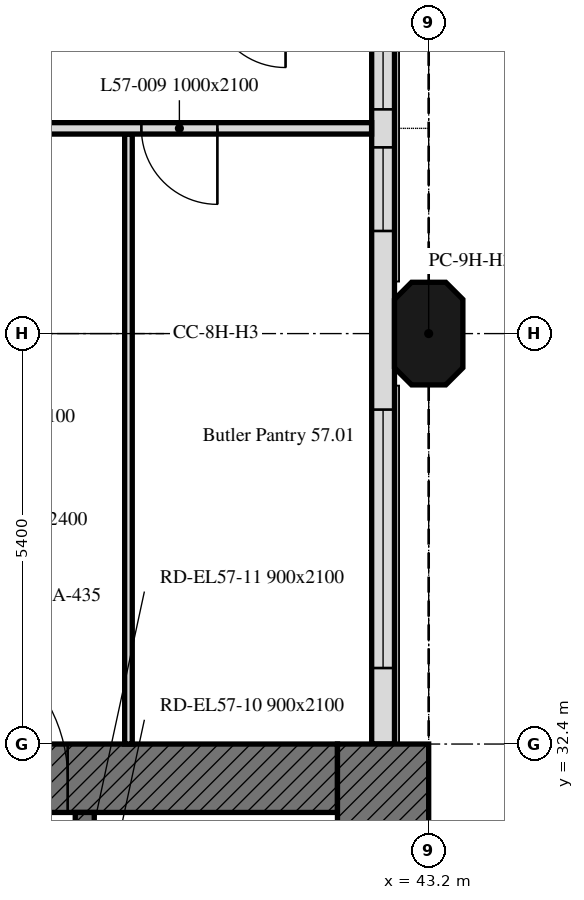
"""IFC4 building model, lengths in metres.
Left out: names, types, materials, properties, quantities, classifications, styles, units other than length and angle.
Written with IfcOpenShell. Run it as: python <this file> out.ifc"""

import sys

from ifc_helpers import new_model, si_unit, direction, frame, frame_2d, origin, place, context, subcontext, project, spatial, polyline, rectangle, outline, extrude, element, fill, save


model = new_model("IFC4")
c1 = context("Model", 3, precision=1e-05, world=origin(), true_north=direction((0.0, 1.0)))
c2 = subcontext(c1, "Body", "Model", "MODEL_VIEW")
j1 = project(units=[si_unit("LENGTHUNIT", "METRE"), si_unit("PLANEANGLEUNIT", "RADIAN")], contexts=[c1])
p1 = place(None, origin())
s1 = spatial("IfcSite", under=j1, at=p1, CompositionType="ELEMENT")
p2 = place(p1, origin())
s2 = spatial("IfcBuilding", under=s1, at=p2, CompositionType="ELEMENT")
p3 = place(p2, frame((0.0, 0.0, 226.9)))
s3 = spatial("IfcBuildingStorey", under=s2, at=p3, CompositionType="ELEMENT", Elevation=226.9)
p4 = place(p3, frame((43.2, 37.8, 0.0), z_axis=(0.0, 0.0, 1.0), x_axis=(0.0, 1.0, 0.0)))
e1 = element("IfcColumn", 1, at=p4, inside=s3, PredefinedType="COLUMN", context=c2, shape_type="SweptSolid", body=[
    extrude(outline(polyline([(-0.45, -0.45), (0.45, -0.45), (0.675, -0.225), (0.675, 0.225), (0.45, 0.45), (-0.45, 0.45), (-0.675, 0.225), (-0.675, -0.225), (-0.45, -0.45)])), origin(), (0.0, 0.0, 1.0), 3.0),
])
p5 = place(p3, frame((42.6, 32.4, 0.0), z_axis=(0.0, 0.0, 1.0), x_axis=(0.0, 1.0, 0.0)))
e2 = element("IfcWall", 2, at=p5, inside=s3, PredefinedType="SOLIDWALL", context=c2, shape_type="SweptSolid", body=[
    extrude(rectangle(XDim=10.614, YDim=0.3, at=frame_2d((5.307, 0.0))), origin(), (0.0, 0.0, 1.0), 3.0),
])
p6 = place(p5, frame((1.0, 0.0, 0.9)))
e3 = element("IfcOpeningElement", 3, at=p6, cuts=e2, PredefinedType="OPENING", context=c2, shape_type="SweptSolid", body=[
    extrude(rectangle(XDim=3.4, YDim=1.7, at=frame_2d((1.7, 0.85))), frame((0.0, 0.16, 0.0), z_axis=(0.0, -1.0, 0.0), x_axis=(1.0, 0.0, 0.0)), (0.0, 0.0, 1.0), 0.32),
])
p7 = place(p5, frame((6.75, 0.0, 0.9)))
e4 = element("IfcOpeningElement", 4, at=p7, cuts=e2, PredefinedType="OPENING", context=c2, shape_type="SweptSolid", body=[
    extrude(rectangle(XDim=1.1, YDim=1.7, at=frame_2d((0.55, 0.85))), frame((0.0, 0.16, 0.0), z_axis=(0.0, -1.0, 0.0), x_axis=(1.0, 0.0, 0.0)), (0.0, 0.0, 1.0), 0.32),
])
p8 = place(p5, frame((8.35, 0.0, 0.9)))
e5 = element("IfcOpeningElement", 5, at=p8, cuts=e2, PredefinedType="OPENING", context=c2, shape_type="SweptSolid", body=[
    extrude(rectangle(XDim=1.1, YDim=1.7, at=frame_2d((0.55, 0.85))), frame((0.0, 0.16, 0.0), z_axis=(0.0, -1.0, 0.0), x_axis=(1.0, 0.0, 0.0)), (0.0, 0.0, 1.0), 0.32),
])
p9 = place(p3, frame((30.9, 31.95, 0.0), z_axis=(0.0, 0.0, 1.0), x_axis=(1.0, 0.0, 0.0)))
e6 = element("IfcWall", 6, at=p9, inside=s3, PredefinedType="SOLIDWALL", context=c2, shape_type="SweptSolid", body=[
    extrude(rectangle(XDim=11.1, YDim=0.9, at=frame_2d((5.55, 0.0))), origin(), (0.0, 0.0, 1.0), 3.0),
])
p10 = place(p9, frame((5.55, 0.0, 0.0)))
e7 = element("IfcOpeningElement", 7, at=p10, cuts=e6, PredefinedType="OPENING", context=c2, shape_type="SweptSolid", body=[
    extrude(rectangle(XDim=2.0, YDim=2.4, at=frame_2d((1.0, 1.2))), frame((0.0, 0.45, 0.0), z_axis=(0.0, -1.0, 0.0), x_axis=(1.0, 0.0, 0.0)), (0.0, 0.0, 1.0), 0.9),
])
p11 = place(p3, frame((42.6, 32.4, 0.0), z_axis=(0.0, 0.0, 1.0), x_axis=(0.0, -1.0, 0.0)))
e8 = element("IfcWall", 8, at=p11, inside=s3, PredefinedType="SOLIDWALL", context=c2, shape_type="SweptSolid", body=[
    extrude(rectangle(XDim=16.2, YDim=1.2, at=frame_2d((8.1, 0.0))), origin(), (0.0, 0.0, 1.0), 3.0),
])
p12 = place(p3, frame((38.675, 17.1, 0.0), z_axis=(0.0, 0.0, 1.0), x_axis=(0.0, 1.0, 0.0)))
e9 = element("IfcWall", 9, at=p12, inside=s3, PredefinedType="SOLIDWALL", context=c2, shape_type="SweptSolid", body=[
    extrude(rectangle(XDim=14.4, YDim=0.25, at=frame_2d((7.2, 0.0))), origin(), (0.0, 0.0, 1.0), 3.0),
])
p13 = place(p12, frame((4.6, 0.0, 0.0)))
e10 = element("IfcOpeningElement", 10, at=p13, cuts=e9, PredefinedType="OPENING", context=c2, shape_type="SweptSolid", body=[
    extrude(rectangle(XDim=1.0, YDim=2.1, at=frame_2d((0.5, 1.05))), frame((0.0, 0.125, 0.0), z_axis=(0.0, -1.0, 0.0), x_axis=(1.0, 0.0, 0.0)), (0.0, 0.0, 1.0), 0.25),
])
p14 = place(p12, frame((7.062, 0.0, 0.0)))
e11 = element("IfcOpeningElement", 11, at=p14, cuts=e9, PredefinedType="OPENING", context=c2, shape_type="SweptSolid", body=[
    extrude(rectangle(XDim=1.2, YDim=2.1, at=frame_2d((0.6, 1.05))), frame((0.0, 0.125, 0.0), z_axis=(0.0, -1.0, 0.0), x_axis=(1.0, 0.0, 0.0)), (0.0, 0.0, 1.0), 0.25),
])
p15 = place(p12, frame((9.726, 0.0, 0.0)))
e12 = element("IfcOpeningElement", 12, at=p15, cuts=e9, PredefinedType="OPENING", context=c2, shape_type="SweptSolid", body=[
    extrude(rectangle(XDim=0.9, YDim=2.1, at=frame_2d((0.45, 1.05))), frame((0.0, 0.125, 0.0), z_axis=(0.0, -1.0, 0.0), x_axis=(1.0, 0.0, 0.0)), (0.0, 0.0, 1.0), 0.25),
])
p16 = place(p12, frame((11.539, 0.0, 0.0)))
e13 = element("IfcOpeningElement", 13, at=p16, cuts=e9, PredefinedType="OPENING", context=c2, shape_type="SweptSolid", body=[
    extrude(rectangle(XDim=0.9, YDim=2.1, at=frame_2d((0.45, 1.05))), frame((0.0, 0.125, 0.0), z_axis=(0.0, -1.0, 0.0), x_axis=(1.0, 0.0, 0.0)), (0.0, 0.0, 1.0), 0.25),
])
p17 = place(p12, frame((13.226, 0.0, 0.0)))
e14 = element("IfcOpeningElement", 14, at=p17, cuts=e9, PredefinedType="OPENING", context=c2, shape_type="SweptSolid", body=[
    extrude(rectangle(XDim=0.9, YDim=2.1, at=frame_2d((0.45, 1.05))), frame((0.0, 0.125, 0.0), z_axis=(0.0, -1.0, 0.0), x_axis=(1.0, 0.0, 0.0)), (0.0, 0.0, 1.0), 0.25),
])
p18 = place(p3, frame((39.25, 32.4, 0.0), z_axis=(0.0, 0.0, 1.0), x_axis=(0.0, 1.0, 0.0)))
e15 = element("IfcWall", 15, at=p18, inside=s3, PredefinedType="PARTITIONING", context=c2, shape_type="SweptSolid", body=[
    extrude(rectangle(XDim=8.025, YDim=0.1, at=frame_2d((4.013, 0.0))), origin(), (0.0, 0.0, 1.0), 3.0),
])
p19 = place(p3, frame((42.449, 40.5, 0.0), z_axis=(0.0, 0.0, 1.0), x_axis=(-1.0, 0.0, 0.0)))
e16 = element("IfcWall", 16, at=p19, inside=s3, PredefinedType="PARTITIONING", context=c2, shape_type="SweptSolid", body=[
    extrude(rectangle(XDim=36.974, YDim=0.15, at=frame_2d((18.487, 0.0))), origin(), (0.0, 0.0, 1.0), 2.4),
])
p20 = place(p19, frame((17.649, 0.0, 0.0)))
e17 = element("IfcOpeningElement", 17, at=p20, cuts=e16, PredefinedType="OPENING", context=c2, shape_type="SweptSolid", body=[
    extrude(rectangle(XDim=1.0, YDim=2.1, at=frame_2d((0.5, 1.05))), frame((0.0, 0.075, 0.0), z_axis=(0.0, -1.0, 0.0), x_axis=(1.0, 0.0, 0.0)), (0.0, 0.0, 1.0), 0.15),
])
p21 = place(p19, frame((2.029, 0.0, 0.0)))
e18 = element("IfcOpeningElement", 18, at=p21, cuts=e16, PredefinedType="OPENING", context=c2, shape_type="SweptSolid", body=[
    extrude(rectangle(XDim=1.0, YDim=2.1, at=frame_2d((0.5, 1.05))), frame((0.0, 0.075, 0.0), z_axis=(0.0, -1.0, 0.0), x_axis=(1.0, 0.0, 0.0)), (0.0, 0.0, 1.0), 0.15),
])
p22 = place(p19, frame((27.374, 0.0, 0.0)))
e19 = element("IfcOpeningElement", 19, at=p22, cuts=e16, PredefinedType="OPENING", context=c2, shape_type="SweptSolid", body=[
    extrude(rectangle(XDim=1.0, YDim=2.1, at=frame_2d((0.5, 1.05))), frame((0.0, 0.075, 0.0), z_axis=(0.0, -1.0, 0.0), x_axis=(1.0, 0.0, 0.0)), (0.0, 0.0, 1.0), 0.15),
])
p23 = place(p19, frame((7.924, 0.0, 0.0)))
e20 = element("IfcOpeningElement", 20, at=p23, cuts=e16, PredefinedType="OPENING", context=c2, shape_type="SweptSolid", body=[
    extrude(rectangle(XDim=1.0, YDim=2.1, at=frame_2d((0.5, 1.05))), frame((0.0, 0.075, 0.0), z_axis=(0.0, -1.0, 0.0), x_axis=(1.0, 0.0, 0.0)), (0.0, 0.0, 1.0), 0.15),
])
p24 = place(p19, frame((4.699, 0.0, 0.0)))
e21 = element("IfcOpeningElement", 21, at=p24, cuts=e16, PredefinedType="OPENING", context=c2, shape_type="SweptSolid", body=[
    extrude(rectangle(XDim=1.8, YDim=2.4, at=frame_2d((0.9, 1.2))), frame((0.0, 0.075, 0.0), z_axis=(0.0, -1.0, 0.0), x_axis=(1.0, 0.0, 0.0)), (0.0, 0.0, 1.0), 0.15),
])
p25 = place(p19, frame((30.199, 0.0, 0.0)))
e22 = element("IfcOpeningElement", 22, at=p25, cuts=e16, PredefinedType="OPENING", context=c2, shape_type="SweptSolid", body=[
    extrude(rectangle(XDim=1.0, YDim=2.1, at=frame_2d((0.5, 1.05))), frame((0.0, 0.075, 0.0), z_axis=(0.0, -1.0, 0.0), x_axis=(1.0, 0.0, 0.0)), (0.0, 0.0, 1.0), 0.15),
])
p26 = place(p6, origin())
e23 = element("IfcWindow", 23, at=p26, inside=s3, PartitioningType="SINGLE_PANEL", PredefinedType="WINDOW", context=c2, shape_type="SweptSolid", body=[
    extrude(rectangle(XDim=3.4, YDim=1.7, at=frame_2d((1.7, 0.85))), frame((0.0, 0.03, 0.0), z_axis=(0.0, -1.0, 0.0), x_axis=(1.0, 0.0, 0.0)), (0.0, 0.0, 1.0), 0.06),
])
fill(e3, e23)
p27 = place(p7, origin())
e24 = element("IfcWindow", 24, at=p27, inside=s3, PartitioningType="SINGLE_PANEL", PredefinedType="WINDOW", context=c2, shape_type="SweptSolid", body=[
    extrude(rectangle(XDim=1.1, YDim=1.7, at=frame_2d((0.55, 0.85))), frame((0.0, 0.03, 0.0), z_axis=(0.0, -1.0, 0.0), x_axis=(1.0, 0.0, 0.0)), (0.0, 0.0, 1.0), 0.06),
])
fill(e4, e24)
p28 = place(p8, origin())
e25 = element("IfcWindow", 25, at=p28, inside=s3, PartitioningType="SINGLE_PANEL", PredefinedType="WINDOW", context=c2, shape_type="SweptSolid", body=[
    extrude(rectangle(XDim=1.1, YDim=1.7, at=frame_2d((0.55, 0.85))), frame((0.0, 0.03, 0.0), z_axis=(0.0, -1.0, 0.0), x_axis=(1.0, 0.0, 0.0)), (0.0, 0.0, 1.0), 0.06),
])
fill(e5, e25)
p29 = place(p10, origin())
e26 = element("IfcDoor", 26, at=p29, inside=s3, OperationType="DOUBLE_DOOR_SINGLE_SWING", PredefinedType="DOOR", context=c2, shape_type="SweptSolid", body=[
    extrude(rectangle(XDim=2.0, YDim=2.4, at=frame_2d((1.0, 1.2))), frame((0.0, 0.025, 0.0), z_axis=(0.0, -1.0, 0.0), x_axis=(1.0, 0.0, 0.0)), (0.0, 0.0, 1.0), 0.05),
])
fill(e7, e26)
p30 = place(p21, origin())
e27 = element("IfcDoor", 27, at=p30, inside=s3, OperationType="SINGLE_SWING_LEFT", PredefinedType="DOOR", context=c2, shape_type="SweptSolid", body=[
    extrude(rectangle(XDim=1.0, YDim=2.1, at=frame_2d((0.5, 1.05))), frame((0.0, 0.025, 0.0), z_axis=(0.0, -1.0, 0.0), x_axis=(1.0, 0.0, 0.0)), (0.0, 0.0, 1.0), 0.05),
])
fill(e18, e27)
save(model, sys.argv[1])
